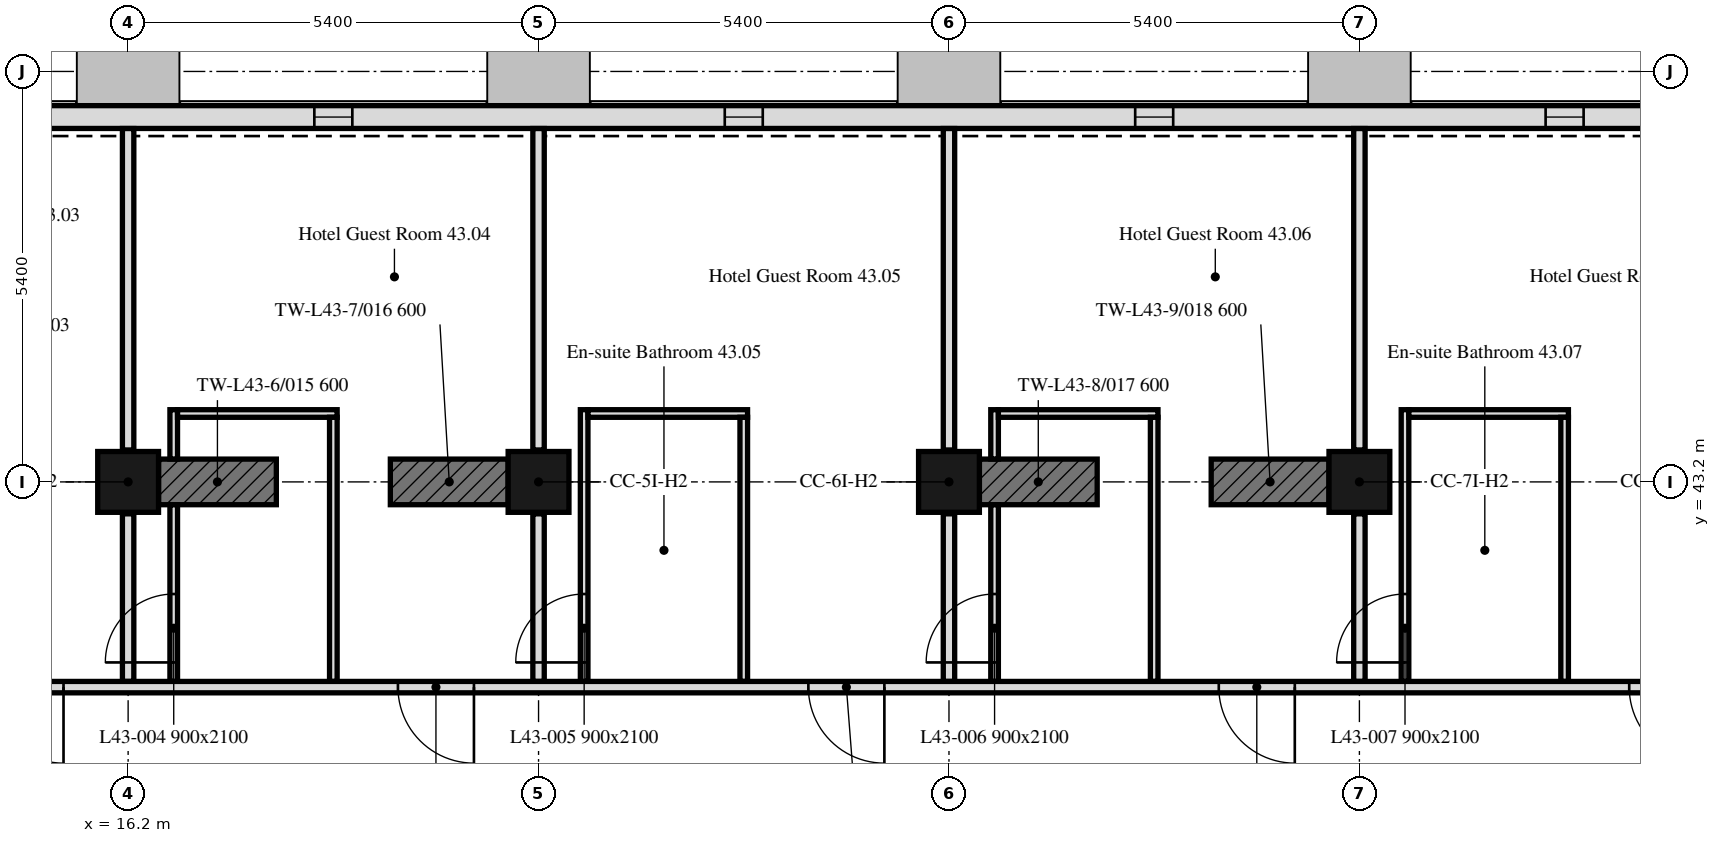
"""IFC4 building model, lengths in metres.
Left out: names, types, materials, properties, quantities, classifications, styles, units other than length and angle.
Written with IfcOpenShell. Run it as: python <this file> out.ifc"""

import sys

from ifc_helpers import new_model, si_unit, direction, frame, frame_2d, origin, origin_2d, place, context, subcontext, project, spatial, rectangle, extrude, element, fill, save


model = new_model("IFC4")
c1 = context("Model", 3, precision=1e-05, world=origin(), true_north=direction((0.0, 1.0)))
c2 = subcontext(c1, "Body", "Model", "MODEL_VIEW")
j1 = project(units=[si_unit("LENGTHUNIT", "METRE"), si_unit("PLANEANGLEUNIT", "RADIAN")], contexts=[c1])
p1 = place(None, origin())
s1 = spatial("IfcSite", under=j1, at=p1, CompositionType="ELEMENT")
p2 = place(p1, origin())
s2 = spatial("IfcBuilding", under=s1, at=p2, CompositionType="ELEMENT")
p3 = place(p2, frame((0.0, 0.0, 180.7)))
s3 = spatial("IfcBuildingStorey", under=s2, at=p3, CompositionType="ELEMENT", Elevation=180.7)
for number, where, z_axis, x_axis in (
    (1, (16.2, 43.2, 0.0), (0.0, 0.0, 1.0), (1.0, 0.0, 0.0)),
    (2, (21.6, 43.2, 0.0), (0.0, 0.0, 1.0), (1.0, 0.0, 0.0)),
    (3, (27.0, 43.2, 0.0), (0.0, 0.0, 1.0), (1.0, 0.0, 0.0)),
    (4, (32.4, 43.2, 0.0), (0.0, 0.0, 1.0), (1.0, 0.0, 0.0)),
):
    element("IfcColumn", number, at=place(p3, frame(where, z_axis=z_axis, x_axis=x_axis)), inside=s3, PredefinedType="COLUMN", context=c2, shape_type="SweptSolid", body=[
        extrude(rectangle(XDim=0.8, YDim=0.8, at=origin_2d()), origin(), (0.0, 0.0, 1.0), 3.0),
    ])
p4 = place(p3, frame((16.6, 43.2, 0.0), z_axis=(0.0, 0.0, 1.0), x_axis=(1.0, 0.0, 0.0)))
e5 = element("IfcWall", 5, at=p4, inside=s3, PredefinedType="SHEAR", context=c2, shape_type="SweptSolid", body=[
    extrude(rectangle(XDim=1.55, YDim=0.6, at=frame_2d((0.775, 0.0))), origin(), (0.0, 0.0, 1.0), 3.0),
])
for number, where, z_axis, x_axis in (
    (6, (19.65, 43.2, 0.0), (0.0, 0.0, 1.0), (1.0, 0.0, 0.0)),
    (7, (27.4, 43.2, 0.0), (0.0, 0.0, 1.0), (1.0, 0.0, 0.0)),
    (8, (30.45, 43.2, 0.0), (0.0, 0.0, 1.0), (1.0, 0.0, 0.0)),
):
    element("IfcWall", number, at=place(p3, frame(where, z_axis=z_axis, x_axis=x_axis)), inside=s3, PredefinedType="SHEAR", context=c2, shape_type="SweptSolid", body=[
        extrude(rectangle(XDim=1.55, YDim=0.6, at=frame_2d((0.775, 0.0))), origin(), (0.0, 0.0, 1.0), 3.0),
    ])
p5 = place(p3, frame((43.014, 48.0, 0.0), z_axis=(0.0, 0.0, 1.0), x_axis=(-1.0, 0.0, 0.0)))
e9 = element("IfcWall", 9, at=p5, inside=s3, PredefinedType="SOLIDWALL", context=c2, shape_type="SweptSolid", body=[
    extrude(rectangle(XDim=32.027, YDim=0.3, at=frame_2d((16.014, 0.0))), origin(), (0.0, 0.0, 1.0), 3.0),
])
p6 = place(p5, frame((0.814, 0.0, 0.9)))
e10 = element("IfcOpeningElement", 10, at=p6, cuts=e9, PredefinedType="OPENING", context=c2, shape_type="SweptSolid", body=[
    extrude(rectangle(XDim=3.4, YDim=1.7, at=frame_2d((1.7, 0.85))), frame((0.0, 0.16, 0.0), z_axis=(0.0, -1.0, 0.0), x_axis=(1.0, 0.0, 0.0)), (0.0, 0.0, 1.0), 0.32),
])
p7 = place(p5, frame((7.664, 0.0, 0.9)))
e11 = element("IfcOpeningElement", 11, at=p7, cuts=e9, PredefinedType="OPENING", context=c2, shape_type="SweptSolid", body=[
    extrude(rectangle(XDim=0.5, YDim=1.7, at=frame_2d((0.25, 0.85))), frame((0.0, 0.16, 0.0), z_axis=(0.0, -1.0, 0.0), x_axis=(1.0, 0.0, 0.0)), (0.0, 0.0, 1.0), 0.32),
])
p8 = place(p5, frame((13.064, 0.0, 0.9)))
e12 = element("IfcOpeningElement", 12, at=p8, cuts=e9, PredefinedType="OPENING", context=c2, shape_type="SweptSolid", body=[
    extrude(rectangle(XDim=0.5, YDim=1.7, at=frame_2d((0.25, 0.85))), frame((0.0, 0.16, 0.0), z_axis=(0.0, -1.0, 0.0), x_axis=(1.0, 0.0, 0.0)), (0.0, 0.0, 1.0), 0.32),
])
p9 = place(p5, frame((18.464, 0.0, 0.9)))
e13 = element("IfcOpeningElement", 13, at=p9, cuts=e9, PredefinedType="OPENING", context=c2, shape_type="SweptSolid", body=[
    extrude(rectangle(XDim=0.5, YDim=1.7, at=frame_2d((0.25, 0.85))), frame((0.0, 0.16, 0.0), z_axis=(0.0, -1.0, 0.0), x_axis=(1.0, 0.0, 0.0)), (0.0, 0.0, 1.0), 0.32),
])
p10 = place(p5, frame((23.864, 0.0, 0.9)))
e14 = element("IfcOpeningElement", 14, at=p10, cuts=e9, PredefinedType="OPENING", context=c2, shape_type="SweptSolid", body=[
    extrude(rectangle(XDim=0.5, YDim=1.7, at=frame_2d((0.25, 0.85))), frame((0.0, 0.16, 0.0), z_axis=(0.0, -1.0, 0.0), x_axis=(1.0, 0.0, 0.0)), (0.0, 0.0, 1.0), 0.32),
])
p11 = place(p5, frame((28.164, 0.0, 0.9)))
e15 = element("IfcOpeningElement", 15, at=p11, cuts=e9, PredefinedType="OPENING", context=c2, shape_type="SweptSolid", body=[
    extrude(rectangle(XDim=1.1, YDim=1.7, at=frame_2d((0.55, 0.85))), frame((0.0, 0.16, 0.0), z_axis=(0.0, -1.0, 0.0), x_axis=(1.0, 0.0, 0.0)), (0.0, 0.0, 1.0), 0.32),
])
p12 = place(p3, frame((16.2, 40.575, 0.0), z_axis=(0.0, 0.0, 1.0), x_axis=(0.0, 1.0, 0.0)))
e16 = element("IfcWall", 16, at=p12, inside=s3, PredefinedType="PARTITIONING", context=c2, shape_type="SweptSolid", body=[
    extrude(rectangle(XDim=2.205, YDim=0.15, at=frame_2d((1.103, 0.0))), origin(), (0.0, 0.0, 1.0), 2.4),
])
p13 = place(p3, frame((16.2, 43.62, 0.0), z_axis=(0.0, 0.0, 1.0), x_axis=(0.0, 1.0, 0.0)))
e17 = element("IfcWall", 17, at=p13, inside=s3, PredefinedType="PARTITIONING", context=c2, shape_type="SweptSolid", body=[
    extrude(rectangle(XDim=4.229, YDim=0.15, at=frame_2d((2.115, 0.0))), origin(), (0.0, 0.0, 1.0), 2.4),
])
p14 = place(p3, frame((21.6, 40.575, 0.0), z_axis=(0.0, 0.0, 1.0), x_axis=(0.0, 1.0, 0.0)))
e18 = element("IfcWall", 18, at=p14, inside=s3, PredefinedType="PARTITIONING", context=c2, shape_type="SweptSolid", body=[
    extrude(rectangle(XDim=2.205, YDim=0.15, at=frame_2d((1.103, 0.0))), origin(), (0.0, 0.0, 1.0), 2.4),
])
p15 = place(p3, frame((21.6, 43.62, 0.0), z_axis=(0.0, 0.0, 1.0), x_axis=(0.0, 1.0, 0.0)))
e19 = element("IfcWall", 19, at=p15, inside=s3, PredefinedType="PARTITIONING", context=c2, shape_type="SweptSolid", body=[
    extrude(rectangle(XDim=4.229, YDim=0.15, at=frame_2d((2.115, 0.0))), origin(), (0.0, 0.0, 1.0), 2.4),
])
p16 = place(p3, frame((16.8, 40.575, 0.0), z_axis=(0.0, 0.0, 1.0), x_axis=(0.0, 1.0, 0.0)))
e20 = element("IfcWall", 20, at=p16, inside=s3, PredefinedType="PARTITIONING", context=c2, shape_type="SweptSolid", body=[
    extrude(rectangle(XDim=2.324, YDim=0.1, at=frame_2d((1.162, 0.0))), origin(), (0.0, 0.0, 1.0), 3.0),
])
p17 = place(p16, frame((0.25, 0.0, 0.0)))
e21 = element("IfcOpeningElement", 21, at=p17, cuts=e20, PredefinedType="OPENING", context=c2, shape_type="SweptSolid", body=[
    extrude(rectangle(XDim=0.9, YDim=2.1, at=frame_2d((0.45, 1.05))), frame((0.0, 0.05, 0.0), z_axis=(0.0, -1.0, 0.0), x_axis=(1.0, 0.0, 0.0)), (0.0, 0.0, 1.0), 0.1),
])
p18 = place(p3, frame((16.8, 43.501, 0.0), z_axis=(0.0, 0.0, 1.0), x_axis=(0.0, 1.0, 0.0)))
e22 = element("IfcWall", 22, at=p18, inside=s3, PredefinedType="PARTITIONING", context=c2, shape_type="SweptSolid", body=[
    extrude(rectangle(XDim=0.649, YDim=0.1, at=frame_2d((0.324, 0.0))), origin(), (0.0, 0.0, 1.0), 3.0),
])
p19 = place(p3, frame((16.85, 44.1, 0.0), z_axis=(0.0, 0.0, 1.0), x_axis=(1.0, 0.0, 0.0)))
e23 = element("IfcWall", 23, at=p19, inside=s3, PredefinedType="PARTITIONING", context=c2, shape_type="SweptSolid", body=[
    extrude(rectangle(XDim=2.1, YDim=0.1, at=frame_2d((1.05, 0.0))), origin(), (0.0, 0.0, 1.0), 3.0),
])
p20 = place(p3, frame((18.9, 44.05, 0.0), z_axis=(0.0, 0.0, 1.0), x_axis=(0.0, -1.0, 0.0)))
e24 = element("IfcWall", 24, at=p20, inside=s3, PredefinedType="PARTITIONING", context=c2, shape_type="SweptSolid", body=[
    extrude(rectangle(XDim=3.475, YDim=0.1, at=frame_2d((1.738, 0.0))), origin(), (0.0, 0.0, 1.0), 3.0),
])
p21 = place(p3, frame((27.0, 40.575, 0.0), z_axis=(0.0, 0.0, 1.0), x_axis=(0.0, 1.0, 0.0)))
e25 = element("IfcWall", 25, at=p21, inside=s3, PredefinedType="PARTITIONING", context=c2, shape_type="SweptSolid", body=[
    extrude(rectangle(XDim=2.205, YDim=0.15, at=frame_2d((1.103, 0.0))), origin(), (0.0, 0.0, 1.0), 2.4),
])
p22 = place(p3, frame((27.0, 43.62, 0.0), z_axis=(0.0, 0.0, 1.0), x_axis=(0.0, 1.0, 0.0)))
e26 = element("IfcWall", 26, at=p22, inside=s3, PredefinedType="PARTITIONING", context=c2, shape_type="SweptSolid", body=[
    extrude(rectangle(XDim=4.229, YDim=0.15, at=frame_2d((2.115, 0.0))), origin(), (0.0, 0.0, 1.0), 2.4),
])
p23 = place(p3, frame((22.2, 40.575, 0.0), z_axis=(0.0, 0.0, 1.0), x_axis=(0.0, 1.0, 0.0)))
e27 = element("IfcWall", 27, at=p23, inside=s3, PredefinedType="PARTITIONING", context=c2, shape_type="SweptSolid", body=[
    extrude(rectangle(XDim=3.575, YDim=0.1, at=frame_2d((1.788, 0.0))), origin(), (0.0, 0.0, 1.0), 3.0),
])
p24 = place(p23, frame((0.25, 0.0, 0.0)))
e28 = element("IfcOpeningElement", 28, at=p24, cuts=e27, PredefinedType="OPENING", context=c2, shape_type="SweptSolid", body=[
    extrude(rectangle(XDim=0.9, YDim=2.1, at=frame_2d((0.45, 1.05))), frame((0.0, 0.05, 0.0), z_axis=(0.0, -1.0, 0.0), x_axis=(1.0, 0.0, 0.0)), (0.0, 0.0, 1.0), 0.1),
])
p25 = place(p3, frame((22.25, 44.1, 0.0), z_axis=(0.0, 0.0, 1.0), x_axis=(1.0, 0.0, 0.0)))
e29 = element("IfcWall", 29, at=p25, inside=s3, PredefinedType="PARTITIONING", context=c2, shape_type="SweptSolid", body=[
    extrude(rectangle(XDim=2.1, YDim=0.1, at=frame_2d((1.05, 0.0))), origin(), (0.0, 0.0, 1.0), 3.0),
])
p26 = place(p3, frame((24.3, 44.05, 0.0), z_axis=(0.0, 0.0, 1.0), x_axis=(0.0, -1.0, 0.0)))
e30 = element("IfcWall", 30, at=p26, inside=s3, PredefinedType="PARTITIONING", context=c2, shape_type="SweptSolid", body=[
    extrude(rectangle(XDim=3.475, YDim=0.1, at=frame_2d((1.738, 0.0))), origin(), (0.0, 0.0, 1.0), 3.0),
])
p27 = place(p3, frame((32.4, 40.575, 0.0), z_axis=(0.0, 0.0, 1.0), x_axis=(0.0, 1.0, 0.0)))
e31 = element("IfcWall", 31, at=p27, inside=s3, PredefinedType="PARTITIONING", context=c2, shape_type="SweptSolid", body=[
    extrude(rectangle(XDim=2.205, YDim=0.15, at=frame_2d((1.103, 0.0))), origin(), (0.0, 0.0, 1.0), 2.4),
])
p28 = place(p3, frame((32.4, 43.62, 0.0), z_axis=(0.0, 0.0, 1.0), x_axis=(0.0, 1.0, 0.0)))
e32 = element("IfcWall", 32, at=p28, inside=s3, PredefinedType="PARTITIONING", context=c2, shape_type="SweptSolid", body=[
    extrude(rectangle(XDim=4.229, YDim=0.15, at=frame_2d((2.115, 0.0))), origin(), (0.0, 0.0, 1.0), 2.4),
])
p29 = place(p3, frame((27.6, 40.575, 0.0), z_axis=(0.0, 0.0, 1.0), x_axis=(0.0, 1.0, 0.0)))
e33 = element("IfcWall", 33, at=p29, inside=s3, PredefinedType="PARTITIONING", context=c2, shape_type="SweptSolid", body=[
    extrude(rectangle(XDim=2.324, YDim=0.1, at=frame_2d((1.162, 0.0))), origin(), (0.0, 0.0, 1.0), 3.0),
])
p30 = place(p29, frame((0.25, 0.0, 0.0)))
e34 = element("IfcOpeningElement", 34, at=p30, cuts=e33, PredefinedType="OPENING", context=c2, shape_type="SweptSolid", body=[
    extrude(rectangle(XDim=0.9, YDim=2.1, at=frame_2d((0.45, 1.05))), frame((0.0, 0.05, 0.0), z_axis=(0.0, -1.0, 0.0), x_axis=(1.0, 0.0, 0.0)), (0.0, 0.0, 1.0), 0.1),
])
p31 = place(p3, frame((27.6, 43.501, 0.0), z_axis=(0.0, 0.0, 1.0), x_axis=(0.0, 1.0, 0.0)))
e35 = element("IfcWall", 35, at=p31, inside=s3, PredefinedType="PARTITIONING", context=c2, shape_type="SweptSolid", body=[
    extrude(rectangle(XDim=0.649, YDim=0.1, at=frame_2d((0.324, 0.0))), origin(), (0.0, 0.0, 1.0), 3.0),
])
p32 = place(p3, frame((27.65, 44.1, 0.0), z_axis=(0.0, 0.0, 1.0), x_axis=(1.0, 0.0, 0.0)))
e36 = element("IfcWall", 36, at=p32, inside=s3, PredefinedType="PARTITIONING", context=c2, shape_type="SweptSolid", body=[
    extrude(rectangle(XDim=2.1, YDim=0.1, at=frame_2d((1.05, 0.0))), origin(), (0.0, 0.0, 1.0), 3.0),
])
p33 = place(p3, frame((29.7, 44.05, 0.0), z_axis=(0.0, 0.0, 1.0), x_axis=(0.0, -1.0, 0.0)))
e37 = element("IfcWall", 37, at=p33, inside=s3, PredefinedType="PARTITIONING", context=c2, shape_type="SweptSolid", body=[
    extrude(rectangle(XDim=3.475, YDim=0.1, at=frame_2d((1.738, 0.0))), origin(), (0.0, 0.0, 1.0), 3.0),
])
p34 = place(p3, frame((33.0, 40.575, 0.0), z_axis=(0.0, 0.0, 1.0), x_axis=(0.0, 1.0, 0.0)))
e38 = element("IfcWall", 38, at=p34, inside=s3, PredefinedType="PARTITIONING", context=c2, shape_type="SweptSolid", body=[
    extrude(rectangle(XDim=3.575, YDim=0.1, at=frame_2d((1.788, 0.0))), origin(), (0.0, 0.0, 1.0), 3.0),
])
p35 = place(p34, frame((0.25, 0.0, 0.0)))
e39 = element("IfcOpeningElement", 39, at=p35, cuts=e38, PredefinedType="OPENING", context=c2, shape_type="SweptSolid", body=[
    extrude(rectangle(XDim=0.9, YDim=2.1, at=frame_2d((0.45, 1.05))), frame((0.0, 0.05, 0.0), z_axis=(0.0, -1.0, 0.0), x_axis=(1.0, 0.0, 0.0)), (0.0, 0.0, 1.0), 0.1),
])
p36 = place(p3, frame((33.05, 44.1, 0.0), z_axis=(0.0, 0.0, 1.0), x_axis=(1.0, 0.0, 0.0)))
e40 = element("IfcWall", 40, at=p36, inside=s3, PredefinedType="PARTITIONING", context=c2, shape_type="SweptSolid", body=[
    extrude(rectangle(XDim=2.1, YDim=0.1, at=frame_2d((1.05, 0.0))), origin(), (0.0, 0.0, 1.0), 3.0),
])
p37 = place(p3, frame((35.1, 44.05, 0.0), z_axis=(0.0, 0.0, 1.0), x_axis=(0.0, -1.0, 0.0)))
e41 = element("IfcWall", 41, at=p37, inside=s3, PredefinedType="PARTITIONING", context=c2, shape_type="SweptSolid", body=[
    extrude(rectangle(XDim=3.475, YDim=0.1, at=frame_2d((1.738, 0.0))), origin(), (0.0, 0.0, 1.0), 3.0),
])
p38 = place(p3, frame((47.849, 40.5, 0.0), z_axis=(0.0, 0.0, 1.0), x_axis=(-1.0, 0.0, 0.0)))
e42 = element("IfcWall", 42, at=p38, inside=s3, PredefinedType="PARTITIONING", context=c2, shape_type="SweptSolid", body=[
    extrude(rectangle(XDim=41.698, YDim=0.15, at=frame_2d((20.849, 0.0))), origin(), (0.0, 0.0, 1.0), 2.4),
])
p39 = place(p38, frame((37.899, 0.0, 0.0)))
e43 = element("IfcOpeningElement", 43, at=p39, cuts=e42, PredefinedType="OPENING", context=c2, shape_type="SweptSolid", body=[
    extrude(rectangle(XDim=1.0, YDim=2.1, at=frame_2d((0.5, 1.05))), frame((0.0, 0.075, 0.0), z_axis=(0.0, -1.0, 0.0), x_axis=(1.0, 0.0, 0.0)), (0.0, 0.0, 1.0), 0.15),
])
p40 = place(p38, frame((32.499, 0.0, 0.0)))
e44 = element("IfcOpeningElement", 44, at=p40, cuts=e42, PredefinedType="OPENING", context=c2, shape_type="SweptSolid", body=[
    extrude(rectangle(XDim=1.0, YDim=2.1, at=frame_2d((0.5, 1.05))), frame((0.0, 0.075, 0.0), z_axis=(0.0, -1.0, 0.0), x_axis=(1.0, 0.0, 0.0)), (0.0, 0.0, 1.0), 0.15),
])
p41 = place(p38, frame((27.099, 0.0, 0.0)))
e45 = element("IfcOpeningElement", 45, at=p41, cuts=e42, PredefinedType="OPENING", context=c2, shape_type="SweptSolid", body=[
    extrude(rectangle(XDim=1.0, YDim=2.1, at=frame_2d((0.5, 1.05))), frame((0.0, 0.075, 0.0), z_axis=(0.0, -1.0, 0.0), x_axis=(1.0, 0.0, 0.0)), (0.0, 0.0, 1.0), 0.15),
])
p42 = place(p38, frame((21.699, 0.0, 0.0)))
e46 = element("IfcOpeningElement", 46, at=p42, cuts=e42, PredefinedType="OPENING", context=c2, shape_type="SweptSolid", body=[
    extrude(rectangle(XDim=1.0, YDim=2.1, at=frame_2d((0.5, 1.05))), frame((0.0, 0.075, 0.0), z_axis=(0.0, -1.0, 0.0), x_axis=(1.0, 0.0, 0.0)), (0.0, 0.0, 1.0), 0.15),
])
p43 = place(p38, frame((16.299, 0.0, 0.0)))
e47 = element("IfcOpeningElement", 47, at=p43, cuts=e42, PredefinedType="OPENING", context=c2, shape_type="SweptSolid", body=[
    extrude(rectangle(XDim=1.0, YDim=2.1, at=frame_2d((0.5, 1.05))), frame((0.0, 0.075, 0.0), z_axis=(0.0, -1.0, 0.0), x_axis=(1.0, 0.0, 0.0)), (0.0, 0.0, 1.0), 0.15),
])
p44 = place(p38, frame((10.899, 0.0, 0.0)))
e48 = element("IfcOpeningElement", 48, at=p44, cuts=e42, PredefinedType="OPENING", context=c2, shape_type="SweptSolid", body=[
    extrude(rectangle(XDim=1.0, YDim=2.1, at=frame_2d((0.5, 1.05))), frame((0.0, 0.075, 0.0), z_axis=(0.0, -1.0, 0.0), x_axis=(1.0, 0.0, 0.0)), (0.0, 0.0, 1.0), 0.15),
])
p45 = place(p38, frame((2.744, 0.0, 0.0)))
e49 = element("IfcOpeningElement", 49, at=p45, cuts=e42, PredefinedType="OPENING", context=c2, shape_type="SweptSolid", body=[
    extrude(rectangle(XDim=1.0, YDim=2.1, at=frame_2d((0.5, 1.05))), frame((0.0, 0.075, 0.0), z_axis=(0.0, -1.0, 0.0), x_axis=(1.0, 0.0, 0.0)), (0.0, 0.0, 1.0), 0.15),
])
p46 = place(p7, origin())
e50 = element("IfcWindow", 50, at=p46, inside=s3, PartitioningType="SINGLE_PANEL", PredefinedType="WINDOW", context=c2, shape_type="SweptSolid", body=[
    extrude(rectangle(XDim=0.5, YDim=1.7, at=frame_2d((0.25, 0.85))), frame((0.0, 0.03, 0.0), z_axis=(0.0, -1.0, 0.0), x_axis=(1.0, 0.0, 0.0)), (0.0, 0.0, 1.0), 0.06),
])
fill(e11, e50)
p47 = place(p8, origin())
e51 = element("IfcWindow", 51, at=p47, inside=s3, PartitioningType="SINGLE_PANEL", PredefinedType="WINDOW", context=c2, shape_type="SweptSolid", body=[
    extrude(rectangle(XDim=0.5, YDim=1.7, at=frame_2d((0.25, 0.85))), frame((0.0, 0.03, 0.0), z_axis=(0.0, -1.0, 0.0), x_axis=(1.0, 0.0, 0.0)), (0.0, 0.0, 1.0), 0.06),
])
fill(e12, e51)
p48 = place(p9, origin())
e52 = element("IfcWindow", 52, at=p48, inside=s3, PartitioningType="SINGLE_PANEL", PredefinedType="WINDOW", context=c2, shape_type="SweptSolid", body=[
    extrude(rectangle(XDim=0.5, YDim=1.7, at=frame_2d((0.25, 0.85))), frame((0.0, 0.03, 0.0), z_axis=(0.0, -1.0, 0.0), x_axis=(1.0, 0.0, 0.0)), (0.0, 0.0, 1.0), 0.06),
])
fill(e13, e52)
p49 = place(p10, origin())
e53 = element("IfcWindow", 53, at=p49, inside=s3, PartitioningType="SINGLE_PANEL", PredefinedType="WINDOW", context=c2, shape_type="SweptSolid", body=[
    extrude(rectangle(XDim=0.5, YDim=1.7, at=frame_2d((0.25, 0.85))), frame((0.0, 0.03, 0.0), z_axis=(0.0, -1.0, 0.0), x_axis=(1.0, 0.0, 0.0)), (0.0, 0.0, 1.0), 0.06),
])
fill(e14, e53)
p50 = place(p17, origin())
e54 = element("IfcDoor", 54, at=p50, inside=s3, OperationType="SINGLE_SWING_RIGHT", PredefinedType="DOOR", context=c2, shape_type="SweptSolid", body=[
    extrude(rectangle(XDim=0.9, YDim=2.1, at=frame_2d((0.45, 1.05))), frame((0.0, 0.025, 0.0), z_axis=(0.0, -1.0, 0.0), x_axis=(1.0, 0.0, 0.0)), (0.0, 0.0, 1.0), 0.05),
])
fill(e21, e54)
p51 = place(p24, origin())
e55 = element("IfcDoor", 55, at=p51, inside=s3, OperationType="SINGLE_SWING_RIGHT", PredefinedType="DOOR", context=c2, shape_type="SweptSolid", body=[
    extrude(rectangle(XDim=0.9, YDim=2.1, at=frame_2d((0.45, 1.05))), frame((0.0, 0.025, 0.0), z_axis=(0.0, -1.0, 0.0), x_axis=(1.0, 0.0, 0.0)), (0.0, 0.0, 1.0), 0.05),
])
fill(e28, e55)
p52 = place(p30, origin())
e56 = element("IfcDoor", 56, at=p52, inside=s3, OperationType="SINGLE_SWING_LEFT", PredefinedType="DOOR", context=c2, shape_type="SweptSolid", body=[
    extrude(rectangle(XDim=0.9, YDim=2.1, at=frame_2d((0.45, 1.05))), frame((0.0, 0.025, 0.0), z_axis=(0.0, -1.0, 0.0), x_axis=(1.0, 0.0, 0.0)), (0.0, 0.0, 1.0), 0.05),
])
fill(e34, e56)
p53 = place(p35, origin())
e57 = element("IfcDoor", 57, at=p53, inside=s3, OperationType="SINGLE_SWING_LEFT", PredefinedType="DOOR", context=c2, shape_type="SweptSolid", body=[
    extrude(rectangle(XDim=0.9, YDim=2.1, at=frame_2d((0.45, 1.05))), frame((0.0, 0.025, 0.0), z_axis=(0.0, -1.0, 0.0), x_axis=(1.0, 0.0, 0.0)), (0.0, 0.0, 1.0), 0.05),
])
fill(e39, e57)
p54 = place(p40, origin())
e58 = element("IfcDoor", 58, at=p54, inside=s3, OperationType="SINGLE_SWING_RIGHT", PredefinedType="DOOR", context=c2, shape_type="SweptSolid", body=[
    extrude(rectangle(XDim=1.0, YDim=2.1, at=frame_2d((0.5, 1.05))), frame((0.0, 0.025, 0.0), z_axis=(0.0, -1.0, 0.0), x_axis=(1.0, 0.0, 0.0)), (0.0, 0.0, 1.0), 0.05),
])
fill(e44, e58)
p55 = place(p41, origin())
e59 = element("IfcDoor", 59, at=p55, inside=s3, OperationType="SINGLE_SWING_RIGHT", PredefinedType="DOOR", context=c2, shape_type="SweptSolid", body=[
    extrude(rectangle(XDim=1.0, YDim=2.1, at=frame_2d((0.5, 1.05))), frame((0.0, 0.025, 0.0), z_axis=(0.0, -1.0, 0.0), x_axis=(1.0, 0.0, 0.0)), (0.0, 0.0, 1.0), 0.05),
])
fill(e45, e59)
p56 = place(p42, origin())
e60 = element("IfcDoor", 60, at=p56, inside=s3, OperationType="SINGLE_SWING_LEFT", PredefinedType="DOOR", context=c2, shape_type="SweptSolid", body=[
    extrude(rectangle(XDim=1.0, YDim=2.1, at=frame_2d((0.5, 1.05))), frame((0.0, 0.025, 0.0), z_axis=(0.0, -1.0, 0.0), x_axis=(1.0, 0.0, 0.0)), (0.0, 0.0, 1.0), 0.05),
])
fill(e46, e60)
p57 = place(p43, origin())
e61 = element("IfcDoor", 61, at=p57, inside=s3, OperationType="SINGLE_SWING_LEFT", PredefinedType="DOOR", context=c2, shape_type="SweptSolid", body=[
    extrude(rectangle(XDim=1.0, YDim=2.1, at=frame_2d((0.5, 1.05))), frame((0.0, 0.025, 0.0), z_axis=(0.0, -1.0, 0.0), x_axis=(1.0, 0.0, 0.0)), (0.0, 0.0, 1.0), 0.05),
])
fill(e47, e61)
p58 = place(p44, origin())
e62 = element("IfcDoor", 62, at=p58, inside=s3, OperationType="SINGLE_SWING_RIGHT", PredefinedType="DOOR", context=c2, shape_type="SweptSolid", body=[
    extrude(rectangle(XDim=1.0, YDim=2.1, at=frame_2d((0.5, 1.05))), frame((0.0, 0.025, 0.0), z_axis=(0.0, -1.0, 0.0), x_axis=(1.0, 0.0, 0.0)), (0.0, 0.0, 1.0), 0.05),
])
fill(e48, e62)
save(model, sys.argv[1])
